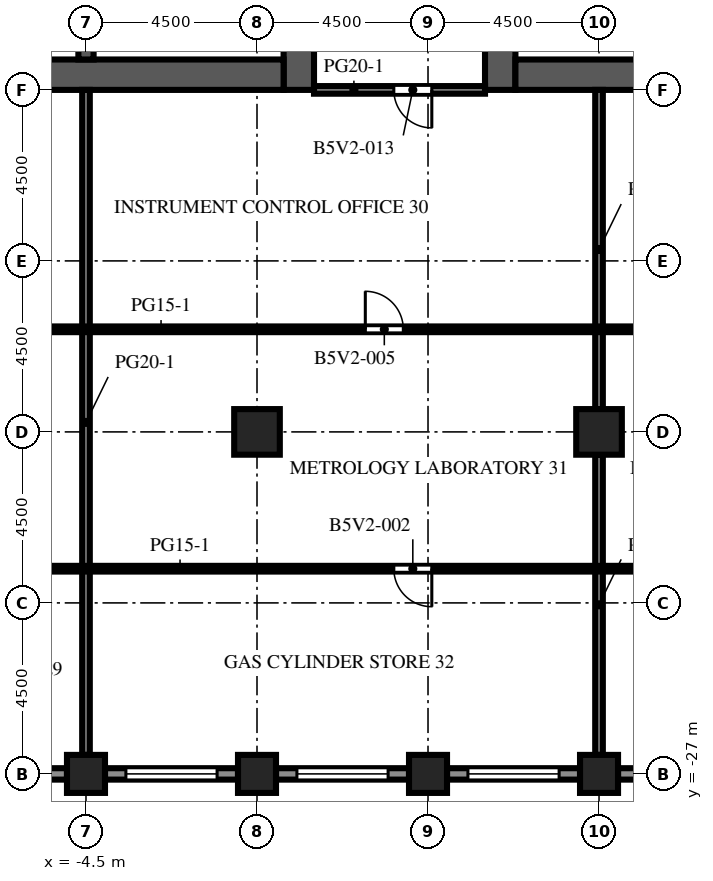
"""IFC4 building model, lengths in metres.
Left out: names, types, materials, properties, quantities, classifications, styles, units other than length and angle.
Written with IfcOpenShell. Run it as: python <this file> out.ifc"""

import sys

from ifc_helpers import new_model, si_unit, direction, frame, frame_2d, origin, origin_2d, place, context, subcontext, project, spatial, rectangle, extrude, element, fill, save


model = new_model("IFC4")
c1 = context("Model", 3, precision=1e-05, world=origin(), true_north=direction((0.0, 1.0)))
c2 = subcontext(c1, "Body", "Model", "MODEL_VIEW")
j1 = project(units=[si_unit("LENGTHUNIT", "METRE"), si_unit("PLANEANGLEUNIT", "RADIAN")], contexts=[c1])
p1 = place(None, origin())
s1 = spatial("IfcSite", under=j1, at=p1, CompositionType="ELEMENT")
p2 = place(p1, origin())
s2 = spatial("IfcBuilding", under=s1, at=p2, CompositionType="ELEMENT")
p3 = place(p2, frame((0.0, 0.0, 177.3)))
s3 = spatial("IfcBuildingStorey", under=s2, at=p3, CompositionType="ELEMENT", Elevation=177.3)
for number, where, z_axis, x_axis in (
    (1, (-4.5, -27.0, 0.0), (0.0, 0.0, 1.0), (1.0, 0.0, 0.0)),
    (2, (0.0, -27.0, 0.0), (0.0, 0.0, 1.0), (1.0, 0.0, 0.0)),
    (3, (4.5, -27.0, 0.0), (0.0, 0.0, 1.0), (1.0, 0.0, 0.0)),
    (4, (9.0, -27.0, 0.0), (0.0, 0.0, 1.0), (1.0, 0.0, 0.0)),
):
    element("IfcColumn", number, at=place(p3, frame(where, z_axis=z_axis, x_axis=x_axis)), inside=s3, PredefinedType="COLUMN", context=c2, shape_type="SweptSolid", body=[
        extrude(rectangle(XDim=1.0, YDim=1.0, at=origin_2d()), origin(), (0.0, 0.0, 1.0), 4.1),
    ])
for number, where, z_axis, x_axis in (
    (5, (0.0, -18.0, 0.0), (0.0, 0.0, 1.0), (1.0, 0.0, 0.0)),
    (6, (9.0, -18.0, 0.0), (0.0, 0.0, 1.0), (1.0, 0.0, 0.0)),
):
    element("IfcColumn", number, at=place(p3, frame(where, z_axis=z_axis, x_axis=x_axis)), inside=s3, PredefinedType="COLUMN", context=c2, shape_type="SweptSolid", body=[
        extrude(rectangle(XDim=1.2, YDim=1.2, at=origin_2d()), origin(), (0.0, 0.0, 1.0), 4.1),
    ])
p4 = place(p3, frame((1.1, -9.0, 0.0), z_axis=(0.0, 0.0, 1.0), x_axis=(0.0, 1.0, 0.0)))
e7 = element("IfcWall", 7, at=p4, inside=s3, PredefinedType="SHEAR", context=c2, shape_type="SweptSolid", body=[
    extrude(rectangle(XDim=27.5, YDim=0.8, at=frame_2d((13.75, 0.0))), origin(), (0.0, 0.0, 1.0), 4.1),
])
p5 = place(p4, frame((12.55, 0.0, 0.0)))
e8 = element("IfcOpeningElement", 8, at=p5, cuts=e7, PredefinedType="OPENING", context=c2, shape_type="SweptSolid", body=[
    extrude(rectangle(XDim=2.4, YDim=2.4, at=frame_2d((1.2, 1.2))), frame((0.0, 0.41, 0.0), z_axis=(0.0, -1.0, 0.0), x_axis=(1.0, 0.0, 0.0)), (0.0, 0.0, 1.0), 0.82),
])
p6 = place(p4, frame((3.85, 0.0, 0.0)))
e9 = element("IfcOpeningElement", 9, at=p6, cuts=e7, PredefinedType="OPENING", context=c2, shape_type="SweptSolid", body=[
    extrude(rectangle(XDim=0.95, YDim=2.1, at=frame_2d((0.475, 1.05))), frame((0.0, 0.41, 0.0), z_axis=(0.0, -1.0, 0.0), x_axis=(1.0, 0.0, 0.0)), (0.0, 0.0, 1.0), 0.82),
])
p7 = place(p4, frame((23.475, 0.0, 0.0)))
e10 = element("IfcOpeningElement", 10, at=p7, cuts=e7, PredefinedType="OPENING", context=c2, shape_type="SweptSolid", body=[
    extrude(rectangle(XDim=1.2, YDim=2.1, at=frame_2d((0.6, 1.05))), frame((0.0, 0.41, 0.0), z_axis=(0.0, -1.0, 0.0), x_axis=(1.0, 0.0, 0.0)), (0.0, 0.0, 1.0), 0.82),
])
p8 = place(p3, frame((-9.7, -8.6, 0.0), z_axis=(0.0, 0.0, 1.0), x_axis=(1.0, 0.0, 0.0)))
e11 = element("IfcWall", 11, at=p8, inside=s3, PredefinedType="SHEAR", context=c2, shape_type="SweptSolid", body=[
    extrude(rectangle(XDim=10.4, YDim=0.8, at=frame_2d((5.2, 0.0))), origin(), (0.0, 0.0, 1.0), 4.1),
])
p9 = place(p3, frame((-4.5, -8.2, 0.0), z_axis=(0.0, 0.0, 1.0), x_axis=(0.0, 1.0, 0.0)))
e12 = element("IfcWall", 12, at=p9, inside=s3, PredefinedType="SHEAR", context=c2, shape_type="SweptSolid", body=[
    extrude(rectangle(XDim=7.5, YDim=0.4, at=frame_2d((3.75, 0.0))), origin(), (0.0, 0.0, 1.0), 4.1),
])
p10 = place(p3, frame((6.4, -9.0, 0.0), z_axis=(0.0, 0.0, 1.0), x_axis=(0.0, 1.0, 0.0)))
e13 = element("IfcWall", 13, at=p10, inside=s3, PredefinedType="SHEAR", context=c2, shape_type="SweptSolid", body=[
    extrude(rectangle(XDim=27.5, YDim=0.8, at=frame_2d((13.75, 0.0))), origin(), (0.0, 0.0, 1.0), 4.1),
])
p11 = place(p10, frame((12.55, 0.0, 0.0)))
e14 = element("IfcOpeningElement", 14, at=p11, cuts=e13, PredefinedType="OPENING", context=c2, shape_type="SweptSolid", body=[
    extrude(rectangle(XDim=2.4, YDim=2.4, at=frame_2d((1.2, 1.2))), frame((0.0, 0.41, 0.0), z_axis=(0.0, -1.0, 0.0), x_axis=(1.0, 0.0, 0.0)), (0.0, 0.0, 1.0), 0.82),
])
p12 = place(p10, frame((3.85, 0.0, 0.0)))
e15 = element("IfcOpeningElement", 15, at=p12, cuts=e13, PredefinedType="OPENING", context=c2, shape_type="SweptSolid", body=[
    extrude(rectangle(XDim=0.95, YDim=2.1, at=frame_2d((0.475, 1.05))), frame((0.0, 0.41, 0.0), z_axis=(0.0, -1.0, 0.0), x_axis=(1.0, 0.0, 0.0)), (0.0, 0.0, 1.0), 0.82),
])
p13 = place(p10, frame((23.475, 0.0, 0.0)))
e16 = element("IfcOpeningElement", 16, at=p13, cuts=e13, PredefinedType="OPENING", context=c2, shape_type="SweptSolid", body=[
    extrude(rectangle(XDim=1.2, YDim=2.1, at=frame_2d((0.6, 1.05))), frame((0.0, 0.41, 0.0), z_axis=(0.0, -1.0, 0.0), x_axis=(1.0, 0.0, 0.0)), (0.0, 0.0, 1.0), 0.82),
])
p14 = place(p3, frame((6.8, -8.6, 0.0), z_axis=(0.0, 0.0, 1.0), x_axis=(1.0, 0.0, 0.0)))
e17 = element("IfcWall", 17, at=p14, inside=s3, PredefinedType="SHEAR", context=c2, shape_type="SweptSolid", body=[
    extrude(rectangle(XDim=10.4, YDim=0.8, at=frame_2d((5.2, 0.0))), origin(), (0.0, 0.0, 1.0), 4.1),
])
p15 = place(p3, frame((-5.0, -27.0, 0.0), z_axis=(0.0, 0.0, 1.0), x_axis=(-1.0, 0.0, 0.0)))
e18 = element("IfcWall", 18, at=p15, inside=s3, PredefinedType="SOLIDWALL", context=c2, shape_type="SweptSolid", body=[
    extrude(rectangle(XDim=3.5, YDim=0.3, at=frame_2d((1.75, 0.0))), origin(), (0.0, 0.0, 1.0), 2.85),
])
p16 = place(p15, frame((0.55, 0.0, 0.8)))
e19 = element("IfcOpeningElement", 19, at=p16, cuts=e18, PredefinedType="OPENING", context=c2, shape_type="SweptSolid", body=[
    extrude(rectangle(XDim=2.4, YDim=1.7, at=frame_2d((1.2, 0.85))), frame((0.0, 0.16, 0.0), z_axis=(0.0, -1.0, 0.0), x_axis=(1.0, 0.0, 0.0)), (0.0, 0.0, 1.0), 0.32),
])
p17 = place(p3, frame((-0.5, -27.0, 0.0), z_axis=(0.0, 0.0, 1.0), x_axis=(-1.0, 0.0, 0.0)))
e20 = element("IfcWall", 20, at=p17, inside=s3, PredefinedType="SOLIDWALL", context=c2, shape_type="SweptSolid", body=[
    extrude(rectangle(XDim=3.5, YDim=0.3, at=frame_2d((1.75, 0.0))), origin(), (0.0, 0.0, 1.0), 2.85),
])
p18 = place(p17, frame((0.55, 0.0, 0.8)))
e21 = element("IfcOpeningElement", 21, at=p18, cuts=e20, PredefinedType="OPENING", context=c2, shape_type="SweptSolid", body=[
    extrude(rectangle(XDim=2.4, YDim=1.7, at=frame_2d((1.2, 0.85))), frame((0.0, 0.16, 0.0), z_axis=(0.0, -1.0, 0.0), x_axis=(1.0, 0.0, 0.0)), (0.0, 0.0, 1.0), 0.32),
])
p19 = place(p3, frame((4.0, -27.0, 0.0), z_axis=(0.0, 0.0, 1.0), x_axis=(-1.0, 0.0, 0.0)))
e22 = element("IfcWall", 22, at=p19, inside=s3, PredefinedType="SOLIDWALL", context=c2, shape_type="SweptSolid", body=[
    extrude(rectangle(XDim=3.5, YDim=0.3, at=frame_2d((1.75, 0.0))), origin(), (0.0, 0.0, 1.0), 2.85),
])
p20 = place(p19, frame((0.55, 0.0, 0.8)))
e23 = element("IfcOpeningElement", 23, at=p20, cuts=e22, PredefinedType="OPENING", context=c2, shape_type="SweptSolid", body=[
    extrude(rectangle(XDim=2.4, YDim=1.7, at=frame_2d((1.2, 0.85))), frame((0.0, 0.16, 0.0), z_axis=(0.0, -1.0, 0.0), x_axis=(1.0, 0.0, 0.0)), (0.0, 0.0, 1.0), 0.32),
])
p21 = place(p3, frame((8.5, -27.0, 0.0), z_axis=(0.0, 0.0, 1.0), x_axis=(-1.0, 0.0, 0.0)))
e24 = element("IfcWall", 24, at=p21, inside=s3, PredefinedType="SOLIDWALL", context=c2, shape_type="SweptSolid", body=[
    extrude(rectangle(XDim=3.5, YDim=0.3, at=frame_2d((1.75, 0.0))), origin(), (0.0, 0.0, 1.0), 2.85),
])
p22 = place(p21, frame((0.55, 0.0, 0.8)))
e25 = element("IfcOpeningElement", 25, at=p22, cuts=e24, PredefinedType="OPENING", context=c2, shape_type="SweptSolid", body=[
    extrude(rectangle(XDim=2.4, YDim=1.7, at=frame_2d((1.2, 0.85))), frame((0.0, 0.16, 0.0), z_axis=(0.0, -1.0, 0.0), x_axis=(1.0, 0.0, 0.0)), (0.0, 0.0, 1.0), 0.32),
])
p23 = place(p3, frame((13.0, -27.0, 0.0), z_axis=(0.0, 0.0, 1.0), x_axis=(-1.0, 0.0, 0.0)))
e26 = element("IfcWall", 26, at=p23, inside=s3, PredefinedType="SOLIDWALL", context=c2, shape_type="SweptSolid", body=[
    extrude(rectangle(XDim=3.5, YDim=0.3, at=frame_2d((1.75, 0.0))), origin(), (0.0, 0.0, 1.0), 2.85),
])
p24 = place(p23, frame((0.55, 0.0, 0.8)))
e27 = element("IfcOpeningElement", 27, at=p24, cuts=e26, PredefinedType="OPENING", context=c2, shape_type="SweptSolid", body=[
    extrude(rectangle(XDim=2.4, YDim=1.7, at=frame_2d((1.2, 0.85))), frame((0.0, 0.16, 0.0), z_axis=(0.0, -1.0, 0.0), x_axis=(1.0, 0.0, 0.0)), (0.0, 0.0, 1.0), 0.32),
])
p25 = place(p3, frame((-4.5, -26.5, 0.0), z_axis=(0.0, 0.0, 1.0), x_axis=(0.0, 1.0, 0.0)))
e28 = element("IfcWall", 28, at=p25, inside=s3, PredefinedType="PARTITIONING", context=c2, shape_type="SweptSolid", body=[
    extrude(rectangle(XDim=17.5, YDim=0.2, at=frame_2d((8.75, 0.0))), origin(), (0.0, 0.0, 1.0), 3.65),
])
p26 = place(p3, frame((9.0, -26.5, 0.0), z_axis=(0.0, 0.0, 1.0), x_axis=(0.0, 1.0, 0.0)))
e29 = element("IfcWall", 29, at=p26, inside=s3, PredefinedType="PARTITIONING", context=c2, shape_type="SweptSolid", body=[
    extrude(rectangle(XDim=7.9, YDim=0.2, at=frame_2d((3.95, 0.0))), origin(), (0.0, 0.0, 1.0), 3.65),
])
p27 = place(p3, frame((9.0, -17.4, 0.0), z_axis=(0.0, 0.0, 1.0), x_axis=(0.0, 1.0, 0.0)))
e30 = element("IfcWall", 30, at=p27, inside=s3, PredefinedType="PARTITIONING", context=c2, shape_type="SweptSolid", body=[
    extrude(rectangle(XDim=8.4, YDim=0.2, at=frame_2d((4.2, 0.0))), origin(), (0.0, 0.0, 1.0), 3.65),
])
p28 = place(p3, frame((21.0, -21.6, 0.0), z_axis=(0.0, 0.0, 1.0), x_axis=(-1.0, 0.0, 0.0)))
e31 = element("IfcWall", 31, at=p28, inside=s3, PredefinedType="PARTITIONING", context=c2, shape_type="SweptSolid", body=[
    extrude(rectangle(XDim=34.5, YDim=0.15, at=frame_2d((17.25, 0.0))), origin(), (0.0, 0.0, 1.0), 3.65),
])
p29 = place(p28, frame((28.65, 0.0, 0.0)))
e32 = element("IfcOpeningElement", 32, at=p29, cuts=e31, PredefinedType="OPENING", context=c2, shape_type="SweptSolid", body=[
    extrude(rectangle(XDim=1.0, YDim=2.1, at=frame_2d((0.5, 1.05))), frame((0.0, 0.085, 0.0), z_axis=(0.0, -1.0, 0.0), x_axis=(1.0, 0.0, 0.0)), (0.0, 0.0, 1.0), 0.17),
])
p30 = place(p28, frame((16.4, 0.0, 0.0)))
e33 = element("IfcOpeningElement", 33, at=p30, cuts=e31, PredefinedType="OPENING", context=c2, shape_type="SweptSolid", body=[
    extrude(rectangle(XDim=1.0, YDim=2.1, at=frame_2d((0.5, 1.05))), frame((0.0, 0.085, 0.0), z_axis=(0.0, -1.0, 0.0), x_axis=(1.0, 0.0, 0.0)), (0.0, 0.0, 1.0), 0.17),
])
p31 = place(p28, frame((5.15, 0.0, 0.0)))
e34 = element("IfcOpeningElement", 34, at=p31, cuts=e31, PredefinedType="OPENING", context=c2, shape_type="SweptSolid", body=[
    extrude(rectangle(XDim=1.0, YDim=2.1, at=frame_2d((0.5, 1.05))), frame((0.0, 0.085, 0.0), z_axis=(0.0, -1.0, 0.0), x_axis=(1.0, 0.0, 0.0)), (0.0, 0.0, 1.0), 0.17),
])
p32 = place(p3, frame((21.0, -15.3, 0.0), z_axis=(0.0, 0.0, 1.0), x_axis=(-1.0, 0.0, 0.0)))
e35 = element("IfcWall", 35, at=p32, inside=s3, PredefinedType="PARTITIONING", context=c2, shape_type="SweptSolid", body=[
    extrude(rectangle(XDim=34.5, YDim=0.15, at=frame_2d((17.25, 0.0))), origin(), (0.0, 0.0, 1.0), 3.65),
])
p33 = place(p32, frame((28.9, 0.0, 0.0)))
e36 = element("IfcOpeningElement", 36, at=p33, cuts=e35, PredefinedType="OPENING", context=c2, shape_type="SweptSolid", body=[
    extrude(rectangle(XDim=1.0, YDim=2.1, at=frame_2d((0.5, 1.05))), frame((0.0, 0.085, 0.0), z_axis=(0.0, -1.0, 0.0), x_axis=(1.0, 0.0, 0.0)), (0.0, 0.0, 1.0), 0.17),
])
p34 = place(p32, frame((17.15, 0.0, 0.0)))
e37 = element("IfcOpeningElement", 37, at=p34, cuts=e35, PredefinedType="OPENING", context=c2, shape_type="SweptSolid", body=[
    extrude(rectangle(XDim=1.0, YDim=2.1, at=frame_2d((0.5, 1.05))), frame((0.0, 0.085, 0.0), z_axis=(0.0, -1.0, 0.0), x_axis=(1.0, 0.0, 0.0)), (0.0, 0.0, 1.0), 0.17),
])
p35 = place(p32, frame((7.15, 0.0, 0.0)))
e38 = element("IfcOpeningElement", 38, at=p35, cuts=e35, PredefinedType="OPENING", context=c2, shape_type="SweptSolid", body=[
    extrude(rectangle(XDim=1.0, YDim=2.1, at=frame_2d((0.5, 1.05))), frame((0.0, 0.085, 0.0), z_axis=(0.0, -1.0, 0.0), x_axis=(1.0, 0.0, 0.0)), (0.0, 0.0, 1.0), 0.17),
])
p36 = place(p3, frame((6.0, -9.0, 0.0), z_axis=(0.0, 0.0, 1.0), x_axis=(-1.0, 0.0, 0.0)))
e39 = element("IfcWall", 39, at=p36, inside=s3, PredefinedType="PARTITIONING", context=c2, shape_type="SweptSolid", body=[
    extrude(rectangle(XDim=4.5, YDim=0.2, at=frame_2d((2.25, 0.0))), origin(), (0.0, 0.0, 1.0), 3.65),
])
p37 = place(p36, frame((1.4, 0.0, 0.0)))
e40 = element("IfcOpeningElement", 40, at=p37, cuts=e39, PredefinedType="OPENING", context=c2, shape_type="SweptSolid", body=[
    extrude(rectangle(XDim=1.0, YDim=2.1, at=frame_2d((0.5, 1.05))), frame((0.0, 0.11, 0.0), z_axis=(0.0, -1.0, 0.0), x_axis=(1.0, 0.0, 0.0)), (0.0, 0.0, 1.0), 0.22),
])
p38 = place(p18, origin())
e41 = element("IfcWindow", 41, at=p38, inside=s3, PartitioningType="SINGLE_PANEL", PredefinedType="WINDOW", context=c2, shape_type="SweptSolid", body=[
    extrude(rectangle(XDim=2.4, YDim=1.7, at=frame_2d((1.2, 0.85))), frame((0.0, 0.03, 0.0), z_axis=(0.0, -1.0, 0.0), x_axis=(1.0, 0.0, 0.0)), (0.0, 0.0, 1.0), 0.06),
])
fill(e21, e41)
p39 = place(p20, origin())
e42 = element("IfcWindow", 42, at=p39, inside=s3, PartitioningType="SINGLE_PANEL", PredefinedType="WINDOW", context=c2, shape_type="SweptSolid", body=[
    extrude(rectangle(XDim=2.4, YDim=1.7, at=frame_2d((1.2, 0.85))), frame((0.0, 0.03, 0.0), z_axis=(0.0, -1.0, 0.0), x_axis=(1.0, 0.0, 0.0)), (0.0, 0.0, 1.0), 0.06),
])
fill(e23, e42)
p40 = place(p22, origin())
e43 = element("IfcWindow", 43, at=p40, inside=s3, PartitioningType="SINGLE_PANEL", PredefinedType="WINDOW", context=c2, shape_type="SweptSolid", body=[
    extrude(rectangle(XDim=2.4, YDim=1.7, at=frame_2d((1.2, 0.85))), frame((0.0, 0.03, 0.0), z_axis=(0.0, -1.0, 0.0), x_axis=(1.0, 0.0, 0.0)), (0.0, 0.0, 1.0), 0.06),
])
fill(e25, e43)
p41 = place(p30, origin())
e44 = element("IfcDoor", 44, at=p41, inside=s3, OperationType="SINGLE_SWING_LEFT", PredefinedType="DOOR", context=c2, shape_type="SweptSolid", body=[
    extrude(rectangle(XDim=1.0, YDim=2.1, at=frame_2d((0.5, 1.05))), frame((0.0, 0.025, 0.0), z_axis=(0.0, -1.0, 0.0), x_axis=(1.0, 0.0, 0.0)), (0.0, 0.0, 1.0), 0.05),
])
fill(e33, e44)
p42 = place(p34, origin())
e45 = element("IfcDoor", 45, at=p42, inside=s3, OperationType="SINGLE_SWING_RIGHT", PredefinedType="DOOR", context=c2, shape_type="SweptSolid", body=[
    extrude(rectangle(XDim=1.0, YDim=2.1, at=frame_2d((0.5, 1.05))), frame((0.0, 0.025, 0.0), z_axis=(0.0, -1.0, 0.0), x_axis=(1.0, 0.0, 0.0)), (0.0, 0.0, 1.0), 0.05),
])
fill(e37, e45)
p43 = place(p37, origin())
e46 = element("IfcDoor", 46, at=p43, inside=s3, OperationType="SINGLE_SWING_LEFT", PredefinedType="DOOR", context=c2, shape_type="SweptSolid", body=[
    extrude(rectangle(XDim=1.0, YDim=2.1, at=frame_2d((0.5, 1.05))), frame((0.0, 0.025, 0.0), z_axis=(0.0, -1.0, 0.0), x_axis=(1.0, 0.0, 0.0)), (0.0, 0.0, 1.0), 0.05),
])
fill(e40, e46)
save(model, sys.argv[1])
